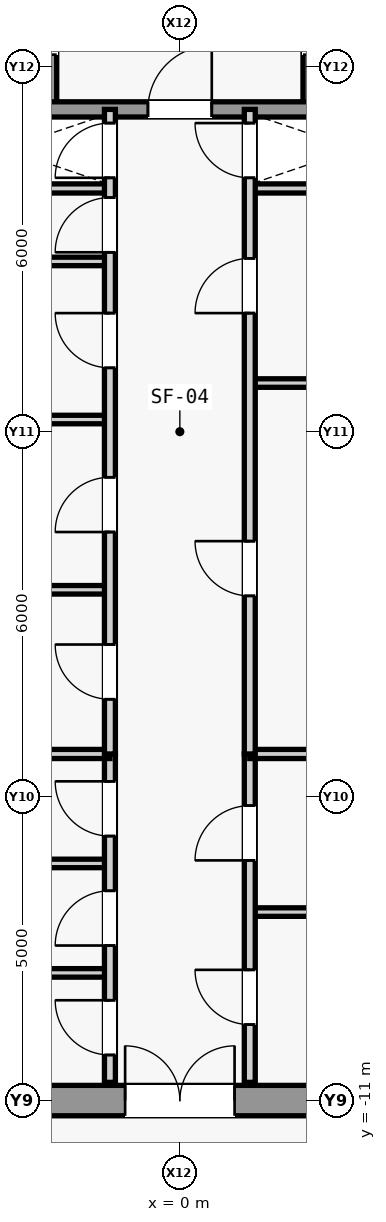
"""IFC4 building model, lengths in metres.
Left out: names, types, materials, properties, quantities, classifications, styles, units other than length and angle.
Written with IfcOpenShell. Run it as: python <this file> out.ifc"""

import sys

from ifc_helpers import new_model, si_unit, direction, frame, frame_2d, origin, place, context, subcontext, project, spatial, rectangle, extrude, source, transform, mapped, element, fill, save


model = new_model("IFC4")
c1 = context("Model", 3, precision=1e-05, world=origin(), true_north=direction((0.0, 1.0)))
c2 = subcontext(c1, "Body", "Model", "MODEL_VIEW")
j1 = project(units=[si_unit("LENGTHUNIT", "METRE"), si_unit("PLANEANGLEUNIT", "RADIAN")], contexts=[c1])
p1 = place(None, origin())
s1 = spatial("IfcSite", under=j1, at=p1, CompositionType="ELEMENT")
p2 = place(p1, origin())
s2 = spatial("IfcBuilding", under=s1, at=p2, CompositionType="ELEMENT")
p3 = place(p2, frame((0.0, 0.0, 235.1)))
s3 = spatial("IfcBuildingStorey", under=s2, at=p3, CompositionType="ELEMENT", Elevation=235.1)
m1 = source(origin(), c2, "Body", "SweptSolid", [
    extrude(rectangle(XDim=9.2, YDim=0.5, at=frame_2d((4.6, 0.0))), origin(), (0.0, 0.0, 1.0), 3.78),
])
p4 = place(p3, frame((-4.6, -11.0, 0.0), z_axis=(0.0, 0.0, 1.0), x_axis=(1.0, 0.0, 0.0)))
e1 = element("IfcWall", 1, at=p4, inside=s3, PredefinedType="SHEAR", context=c2, shape_type="MappedRepresentation", body=[
    mapped(m1, transform((0.0, 0.0, 0.0), scale=1.0)),
])
m2 = source(origin(), c2, "Body", "SweptSolid", [
    extrude(rectangle(XDim=1.8, YDim=2.25, at=frame_2d((0.9, 1.125))), frame((0.0, 0.26, 0.0), z_axis=(0.0, -1.0, 0.0), x_axis=(1.0, 0.0, 0.0)), (0.0, 0.0, 1.0), 0.52),
])
p5 = place(p4, frame((3.7, 0.0, 0.0)))
e2 = element("IfcOpeningElement", 2, at=p5, cuts=e1, PredefinedType="OPENING", context=c2, shape_type="MappedRepresentation", body=[
    mapped(m2, transform((0.0, 0.0, 0.0), scale=1.0)),
])
m3 = source(origin(), c2, "Body", "SweptSolid", [
    extrude(rectangle(XDim=3.45, YDim=0.15, at=frame_2d((1.725, 0.0))), origin(), (0.0, 0.0, 1.0), 3.78),
])
for number, where, z_axis, x_axis in (
    (3, (-4.6, 4.0, 0.0), (0.0, 0.0, 1.0), (1.0, 0.0, 0.0)),
    (4, (1.15, 4.0, 0.0), (0.0, 0.0, 1.0), (1.0, 0.0, 0.0)),
):
    element("IfcWall", number, at=place(p3, frame(where, z_axis=z_axis, x_axis=x_axis)), inside=s3, PredefinedType="PARTITIONING", context=c2, shape_type="MappedRepresentation", body=[
        mapped(m3, transform((0.0, 0.0, 0.0), scale=1.0)),
    ])
m4 = source(origin(), c2, "Body", "SweptSolid", [
    extrude(rectangle(XDim=3.45, YDim=0.14, at=frame_2d((1.725, 0.0))), origin(), (0.0, 0.0, 1.0), 3.78),
])
for number, where, z_axis, x_axis in (
    (5, (-4.6, -8.9, 0.0), (0.0, 0.0, 1.0), (1.0, 0.0, 0.0)),
    (6, (-4.6, -7.1, 0.0), (0.0, 0.0, 1.0), (1.0, 0.0, 0.0)),
):
    element("IfcWall", number, at=place(p3, frame(where, z_axis=z_axis, x_axis=x_axis)), inside=s3, PredefinedType="PARTITIONING", context=c2, shape_type="MappedRepresentation", body=[
        mapped(m4, transform((0.0, 0.0, 0.0), scale=1.0)),
    ])
m5 = source(origin(), c2, "Body", "SweptSolid", [
    extrude(rectangle(XDim=5.4, YDim=0.18, at=frame_2d((2.7, 0.0))), origin(), (0.0, 0.0, 1.0), 3.78),
])
p6 = place(p3, frame((-1.15, -10.7, 0.0), z_axis=(0.0, 0.0, 1.0), x_axis=(0.0, 1.0, 0.0)))
e7 = element("IfcWall", 7, at=p6, inside=s3, PredefinedType="PARTITIONING", context=c2, shape_type="MappedRepresentation", body=[
    mapped(m5, transform((0.0, 0.0, 0.0), scale=1.0)),
])
m6 = source(origin(), c2, "Body", "SweptSolid", [
    extrude(rectangle(XDim=0.9, YDim=2.15, at=frame_2d((0.45, 1.075))), frame((0.0, 0.1, 0.0), z_axis=(0.0, -1.0, 0.0), x_axis=(1.0, 0.0, 0.0)), (0.0, 0.0, 1.0), 0.2),
])
p7 = place(p6, frame((0.45, 0.0, 0.0)))
e8 = element("IfcOpeningElement", 8, at=p7, cuts=e7, PredefinedType="OPENING", context=c2, shape_type="MappedRepresentation", body=[
    mapped(m6, transform((0.0, 0.0, 0.0), scale=1.0)),
])
p8 = place(p6, frame((2.25, 0.0, 0.0)))
e9 = element("IfcOpeningElement", 9, at=p8, cuts=e7, PredefinedType="OPENING", context=c2, shape_type="MappedRepresentation", body=[
    mapped(m6, transform((0.0, 0.0, 0.0), scale=1.0)),
])
p9 = place(p6, frame((4.05, 0.0, 0.0)))
e10 = element("IfcOpeningElement", 10, at=p9, cuts=e7, PredefinedType="OPENING", context=c2, shape_type="MappedRepresentation", body=[
    mapped(m6, transform((0.0, 0.0, 0.0), scale=1.0)),
])
p10 = place(p3, frame((1.15, -7.9, 0.0), z_axis=(0.0, 0.0, 1.0), x_axis=(1.0, 0.0, 0.0)))
e11 = element("IfcWall", 11, at=p10, inside=s3, PredefinedType="PARTITIONING", context=c2, shape_type="MappedRepresentation", body=[
    mapped(m4, transform((0.0, 0.0, 0.0), scale=1.0)),
])
p11 = place(p3, frame((1.15, -10.7, 0.0), z_axis=(0.0, 0.0, 1.0), x_axis=(0.0, 1.0, 0.0)))
e12 = element("IfcWall", 12, at=p11, inside=s3, PredefinedType="PARTITIONING", context=c2, shape_type="MappedRepresentation", body=[
    mapped(m5, transform((0.0, 0.0, 0.0), scale=1.0)),
])
p12 = place(p11, frame((0.95, 0.0, 0.0)))
e13 = element("IfcOpeningElement", 13, at=p12, cuts=e12, PredefinedType="OPENING", context=c2, shape_type="MappedRepresentation", body=[
    mapped(m6, transform((0.0, 0.0, 0.0), scale=1.0)),
])
p13 = place(p11, frame((3.65, 0.0, 0.0)))
e14 = element("IfcOpeningElement", 14, at=p13, cuts=e12, PredefinedType="OPENING", context=c2, shape_type="MappedRepresentation", body=[
    mapped(m6, transform((0.0, 0.0, 0.0), scale=1.0)),
])
for number, where, z_axis, x_axis in (
    (15, (-4.6, -5.3, 0.0), (0.0, 0.0, 1.0), (1.0, 0.0, 0.0)),
    (16, (1.15, -5.3, 0.0), (0.0, 0.0, 1.0), (1.0, 0.0, 0.0)),
):
    element("IfcWall", number, at=place(p3, frame(where, z_axis=z_axis, x_axis=x_axis)), inside=s3, PredefinedType="PARTITIONING", context=c2, shape_type="MappedRepresentation", body=[
        mapped(m3, transform((0.0, 0.0, 0.0), scale=1.0)),
    ])
m7 = source(origin(), c2, "Body", "SweptSolid", [
    extrude(rectangle(XDim=5.4, YDim=0.25, at=frame_2d((2.7, 0.0))), origin(), (0.0, 0.0, 1.0), 3.78),
])
p14 = place(p3, frame((-2.15, 5.3, 0.0), z_axis=(0.0, 0.0, 1.0), x_axis=(0.0, 1.0, 0.0)))
e17 = element("IfcWall", 17, at=p14, inside=s3, PredefinedType="SHEAR", context=c2, shape_type="MappedRepresentation", body=[
    mapped(m7, transform((0.0, 0.0, 0.0), scale=1.0)),
])
m8 = source(origin(), c2, "Body", "SweptSolid", [
    extrude(rectangle(XDim=1.2, YDim=2.3, at=frame_2d((0.6, 1.15))), frame((0.0, 0.135, 0.0), z_axis=(0.0, -1.0, 0.0), x_axis=(1.0, 0.0, 0.0)), (0.0, 0.0, 1.0), 0.27),
])
p15 = place(p14, frame((3.3, 0.0, 0.0)))
e18 = element("IfcOpeningElement", 18, at=p15, cuts=e17, PredefinedType="OPENING", context=c2, shape_type="MappedRepresentation", body=[
    mapped(m8, transform((0.0, 0.0, 0.0), scale=1.0)),
])
p16 = place(p14, frame((0.9, 0.0, 0.0)))
e19 = element("IfcOpeningElement", 19, at=p16, cuts=e17, PredefinedType="OPENING", context=c2, shape_type="MappedRepresentation", body=[
    mapped(m8, transform((0.0, 0.0, 0.0), scale=1.0)),
])
p17 = place(p3, frame((2.15, 5.3, 0.0), z_axis=(0.0, 0.0, 1.0), x_axis=(0.0, 1.0, 0.0)))
e20 = element("IfcWall", 20, at=p17, inside=s3, PredefinedType="SHEAR", context=c2, shape_type="MappedRepresentation", body=[
    mapped(m7, transform((0.0, 0.0, 0.0), scale=1.0)),
])
p18 = place(p17, frame((3.3, 0.0, 0.0)))
e21 = element("IfcOpeningElement", 21, at=p18, cuts=e20, PredefinedType="OPENING", context=c2, shape_type="MappedRepresentation", body=[
    mapped(m8, transform((0.0, 0.0, 0.0), scale=1.0)),
])
p19 = place(p17, frame((0.9, 0.0, 0.0)))
e22 = element("IfcOpeningElement", 22, at=p19, cuts=e20, PredefinedType="OPENING", context=c2, shape_type="MappedRepresentation", body=[
    mapped(m8, transform((0.0, 0.0, 0.0), scale=1.0)),
])
m9 = source(origin(), c2, "Body", "SweptSolid", [
    extrude(rectangle(XDim=9.2, YDim=0.25, at=frame_2d((4.6, 0.0))), origin(), (0.0, 0.0, 1.0), 3.78),
])
p20 = place(p3, frame((-4.6, 5.3, 0.0), z_axis=(0.0, 0.0, 1.0), x_axis=(1.0, 0.0, 0.0)))
e23 = element("IfcWall", 23, at=p20, inside=s3, PredefinedType="SHEAR", context=c2, shape_type="MappedRepresentation", body=[
    mapped(m9, transform((0.0, 0.0, 0.0), scale=1.0)),
])
m10 = source(origin(), c2, "Body", "SweptSolid", [
    extrude(rectangle(XDim=1.05, YDim=2.2, at=frame_2d((0.525, 1.1))), frame((0.0, 0.135, 0.0), z_axis=(0.0, -1.0, 0.0), x_axis=(1.0, 0.0, 0.0)), (0.0, 0.0, 1.0), 0.27),
])
p21 = place(p20, frame((4.075, 0.0, 0.0)))
e24 = element("IfcOpeningElement", 24, at=p21, cuts=e23, PredefinedType="OPENING", context=c2, shape_type="MappedRepresentation", body=[
    mapped(m10, transform((0.0, 0.0, 0.0), scale=1.0)),
])
p22 = place(p3, frame((-4.6, -2.6, 0.0), z_axis=(0.0, 0.0, 1.0), x_axis=(1.0, 0.0, 0.0)))
e25 = element("IfcWall", 25, at=p22, inside=s3, PredefinedType="PARTITIONING", context=c2, shape_type="MappedRepresentation", body=[
    mapped(m4, transform((0.0, 0.0, 0.0), scale=1.0)),
])
m11 = source(origin(), c2, "Body", "SweptSolid", [
    extrude(rectangle(XDim=3.45, YDim=0.14, at=frame_2d((1.725, 0.0))), origin(), (0.0, 0.0, 1.0), 3.085),
])
p23 = place(p3, frame((-4.6, 0.2, 0.0), z_axis=(0.0, 0.0, 1.0), x_axis=(1.0, 0.0, 0.0)))
e26 = element("IfcWall", 26, at=p23, inside=s3, PredefinedType="PARTITIONING", context=c2, shape_type="MappedRepresentation", body=[
    mapped(m11, transform((0.0, 0.0, 0.0), scale=1.0)),
])
p24 = place(p3, frame((-4.6, 2.8, 0.0), z_axis=(0.0, 0.0, 1.0), x_axis=(1.0, 0.0, 0.0)))
e27 = element("IfcWall", 27, at=p24, inside=s3, PredefinedType="PARTITIONING", context=c2, shape_type="MappedRepresentation", body=[
    mapped(m4, transform((0.0, 0.0, 0.0), scale=1.0)),
])
m12 = source(origin(), c2, "Body", "SweptSolid", [
    extrude(rectangle(XDim=10.6, YDim=0.18, at=frame_2d((5.3, 0.0))), origin(), (0.0, 0.0, 1.0), 3.78),
])
p25 = place(p3, frame((-1.15, -5.3, 0.0), z_axis=(0.0, 0.0, 1.0), x_axis=(0.0, 1.0, 0.0)))
e28 = element("IfcWall", 28, at=p25, inside=s3, PredefinedType="PARTITIONING", context=c2, shape_type="MappedRepresentation", body=[
    mapped(m12, transform((0.0, 0.0, 0.0), scale=1.0)),
])
p26 = place(p25, frame((0.9, 0.0, 0.0)))
e29 = element("IfcOpeningElement", 29, at=p26, cuts=e28, PredefinedType="OPENING", context=c2, shape_type="MappedRepresentation", body=[
    mapped(m6, transform((0.0, 0.0, 0.0), scale=1.0)),
])
p27 = place(p25, frame((3.65, 0.0, 0.0)))
e30 = element("IfcOpeningElement", 30, at=p27, cuts=e28, PredefinedType="OPENING", context=c2, shape_type="MappedRepresentation", body=[
    mapped(m6, transform((0.0, 0.0, 0.0), scale=1.0)),
])
p28 = place(p25, frame((6.35, 0.0, 0.0)))
e31 = element("IfcOpeningElement", 31, at=p28, cuts=e28, PredefinedType="OPENING", context=c2, shape_type="MappedRepresentation", body=[
    mapped(m6, transform((0.0, 0.0, 0.0), scale=1.0)),
])
p29 = place(p25, frame((8.25, 0.0, 0.0)))
e32 = element("IfcOpeningElement", 32, at=p29, cuts=e28, PredefinedType="OPENING", context=c2, shape_type="MappedRepresentation", body=[
    mapped(m6, transform((0.0, 0.0, 0.0), scale=1.0)),
])
p30 = place(p25, frame((9.475, 0.0, 0.0)))
e33 = element("IfcOpeningElement", 33, at=p30, cuts=e28, PredefinedType="OPENING", context=c2, shape_type="MappedRepresentation", body=[
    mapped(m6, transform((0.0, 0.0, 0.0), scale=1.0)),
])
p31 = place(p3, frame((1.15, 0.8, 0.0), z_axis=(0.0, 0.0, 1.0), x_axis=(1.0, 0.0, 0.0)))
e34 = element("IfcWall", 34, at=p31, inside=s3, PredefinedType="PARTITIONING", context=c2, shape_type="MappedRepresentation", body=[
    mapped(m4, transform((0.0, 0.0, 0.0), scale=1.0)),
])
p32 = place(p3, frame((1.15, -5.3, 0.0), z_axis=(0.0, 0.0, 1.0), x_axis=(0.0, 1.0, 0.0)))
e35 = element("IfcWall", 35, at=p32, inside=s3, PredefinedType="PARTITIONING", context=c2, shape_type="MappedRepresentation", body=[
    mapped(m12, transform((0.0, 0.0, 0.0), scale=1.0)),
])
p33 = place(p32, frame((2.6, 0.0, 0.0)))
e36 = element("IfcOpeningElement", 36, at=p33, cuts=e35, PredefinedType="OPENING", context=c2, shape_type="MappedRepresentation", body=[
    mapped(m6, transform((0.0, 0.0, 0.0), scale=1.0)),
])
p34 = place(p32, frame((7.25, 0.0, 0.0)))
e37 = element("IfcOpeningElement", 37, at=p34, cuts=e35, PredefinedType="OPENING", context=c2, shape_type="MappedRepresentation", body=[
    mapped(m6, transform((0.0, 0.0, 0.0), scale=1.0)),
])
p35 = place(p32, frame((9.475, 0.0, 0.0)))
e38 = element("IfcOpeningElement", 38, at=p35, cuts=e35, PredefinedType="OPENING", context=c2, shape_type="MappedRepresentation", body=[
    mapped(m6, transform((0.0, 0.0, 0.0), scale=1.0)),
])
m13 = source(origin(), c2, "Body", "SweptSolid", [
    extrude(rectangle(XDim=0.9, YDim=2.15, at=frame_2d((0.45, 1.075))), frame((0.0, 0.025, 0.0), z_axis=(0.0, -1.0, 0.0), x_axis=(1.0, 0.0, 0.0)), (0.0, 0.0, 1.0), 0.05),
])
p36 = place(p7, origin())
e39 = element("IfcDoor", 39, at=p36, inside=s3, OperationType="SINGLE_SWING_RIGHT", PredefinedType="DOOR", context=c2, shape_type="MappedRepresentation", body=[
    mapped(m13, transform((0.0, 0.0, 0.0), scale=1.0)),
])
fill(e8, e39)
p37 = place(p8, origin())
e40 = element("IfcDoor", 40, at=p37, inside=s3, OperationType="SINGLE_SWING_LEFT", PredefinedType="DOOR", context=c2, shape_type="MappedRepresentation", body=[
    mapped(m13, transform((0.0, 0.0, 0.0), scale=1.0)),
])
fill(e9, e40)
p38 = place(p9, origin())
e41 = element("IfcDoor", 41, at=p38, inside=s3, OperationType="SINGLE_SWING_RIGHT", PredefinedType="DOOR", context=c2, shape_type="MappedRepresentation", body=[
    mapped(m13, transform((0.0, 0.0, 0.0), scale=1.0)),
])
fill(e10, e41)
p39 = place(p12, origin())
e42 = element("IfcDoor", 42, at=p39, inside=s3, OperationType="SINGLE_SWING_RIGHT", PredefinedType="DOOR", context=c2, shape_type="MappedRepresentation", body=[
    mapped(m13, transform((0.0, 0.0, 0.0), scale=1.0)),
])
fill(e13, e42)
p40 = place(p13, origin())
e43 = element("IfcDoor", 43, at=p40, inside=s3, OperationType="SINGLE_SWING_LEFT", PredefinedType="DOOR", context=c2, shape_type="MappedRepresentation", body=[
    mapped(m13, transform((0.0, 0.0, 0.0), scale=1.0)),
])
fill(e14, e43)
m14 = source(origin(), c2, "Body", "SweptSolid", [
    extrude(rectangle(XDim=1.8, YDim=2.25, at=frame_2d((0.9, 1.125))), frame((0.0, 0.025, 0.0), z_axis=(0.0, -1.0, 0.0), x_axis=(1.0, 0.0, 0.0)), (0.0, 0.0, 1.0), 0.05),
])
p41 = place(p5, origin())
e44 = element("IfcDoor", 44, at=p41, inside=s3, OperationType="SINGLE_SWING_LEFT", PredefinedType="DOOR", context=c2, shape_type="MappedRepresentation", body=[
    mapped(m14, transform((0.0, 0.0, 0.0), scale=1.0)),
])
fill(e2, e44)
m15 = source(origin(), c2, "Body", "SweptSolid", [
    extrude(rectangle(XDim=1.05, YDim=2.2, at=frame_2d((0.525, 1.1))), frame((0.0, 0.025, 0.0), z_axis=(0.0, -1.0, 0.0), x_axis=(1.0, 0.0, 0.0)), (0.0, 0.0, 1.0), 0.05),
])
p42 = place(p21, origin())
e45 = element("IfcDoor", 45, at=p42, inside=s3, OperationType="SINGLE_SWING_RIGHT", PredefinedType="DOOR", context=c2, shape_type="MappedRepresentation", body=[
    mapped(m15, transform((0.0, 0.0, 0.0), scale=1.0)),
])
fill(e24, e45)
p43 = place(p26, origin())
e46 = element("IfcDoor", 46, at=p43, inside=s3, OperationType="SINGLE_SWING_RIGHT", PredefinedType="DOOR", context=c2, shape_type="MappedRepresentation", body=[
    mapped(m13, transform((0.0, 0.0, 0.0), scale=1.0)),
])
fill(e29, e46)
p44 = place(p27, origin())
e47 = element("IfcDoor", 47, at=p44, inside=s3, OperationType="SINGLE_SWING_LEFT", PredefinedType="DOOR", context=c2, shape_type="MappedRepresentation", body=[
    mapped(m13, transform((0.0, 0.0, 0.0), scale=1.0)),
])
fill(e30, e47)
p45 = place(p28, origin())
e48 = element("IfcDoor", 48, at=p45, inside=s3, OperationType="SINGLE_SWING_RIGHT", PredefinedType="DOOR", context=c2, shape_type="MappedRepresentation", body=[
    mapped(m13, transform((0.0, 0.0, 0.0), scale=1.0)),
])
fill(e31, e48)
p46 = place(p29, origin())
e49 = element("IfcDoor", 49, at=p46, inside=s3, OperationType="SINGLE_SWING_LEFT", PredefinedType="DOOR", context=c2, shape_type="MappedRepresentation", body=[
    mapped(m13, transform((0.0, 0.0, 0.0), scale=1.0)),
])
fill(e32, e49)
p47 = place(p33, origin())
e50 = element("IfcDoor", 50, at=p47, inside=s3, OperationType="SINGLE_SWING_RIGHT", PredefinedType="DOOR", context=c2, shape_type="MappedRepresentation", body=[
    mapped(m13, transform((0.0, 0.0, 0.0), scale=1.0)),
])
fill(e36, e50)
p48 = place(p34, origin())
e51 = element("IfcDoor", 51, at=p48, inside=s3, OperationType="SINGLE_SWING_LEFT", PredefinedType="DOOR", context=c2, shape_type="MappedRepresentation", body=[
    mapped(m13, transform((0.0, 0.0, 0.0), scale=1.0)),
])
fill(e37, e51)
p49 = place(p30, origin())
e52 = element("IfcDoor", 52, at=p49, inside=s3, OperationType="SINGLE_SWING_LEFT", PredefinedType="DOOR", context=c2, shape_type="MappedRepresentation", body=[
    mapped(m13, transform((0.0, 0.0, 0.0), scale=1.0)),
])
fill(e33, e52)
p50 = place(p35, origin())
e53 = element("IfcDoor", 53, at=p50, inside=s3, OperationType="SINGLE_SWING_RIGHT", PredefinedType="DOOR", context=c2, shape_type="MappedRepresentation", body=[
    mapped(m13, transform((0.0, 0.0, 0.0), scale=1.0)),
])
fill(e38, e53)
save(model, sys.argv[1])
